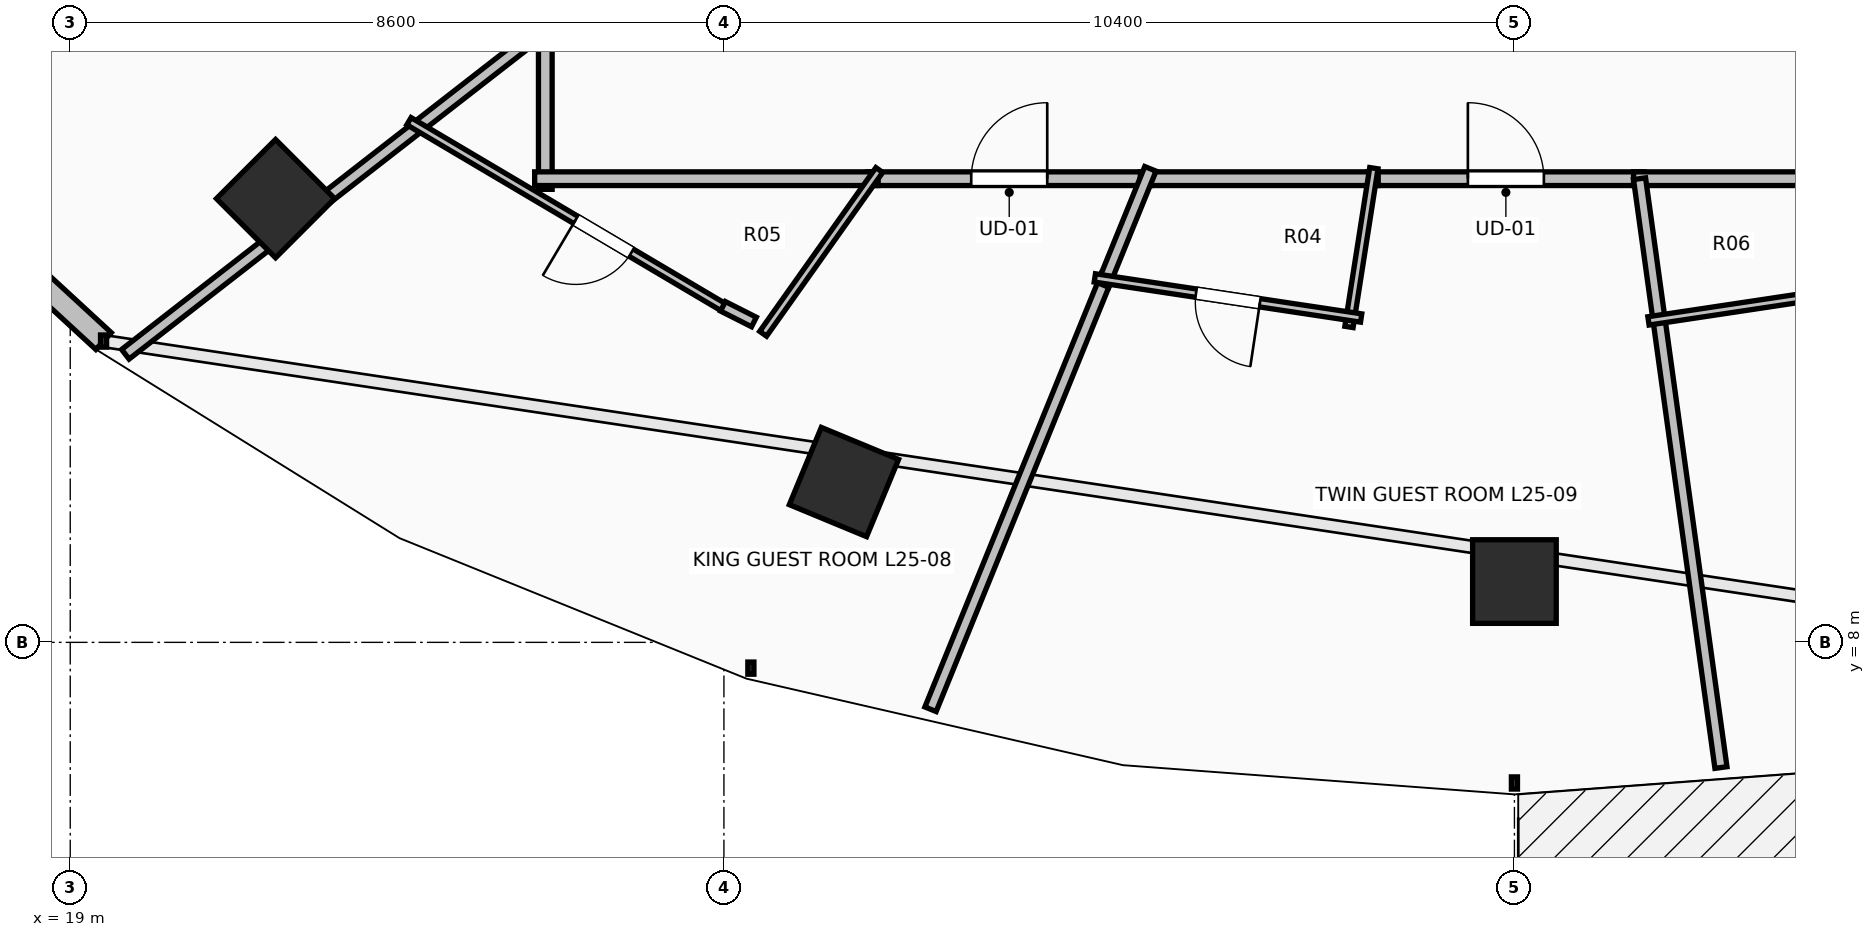
"""IFC4 building model, lengths in metres.
Left out: names, types, materials, properties, quantities, classifications, styles, units other than length and angle.
Written with IfcOpenShell. Run it as: python <this file> out.ifc"""

import sys

from ifc_helpers import new_model, si_unit, direction, frame, frame_2d, origin, origin_2d, place, context, subcontext, project, spatial, rectangle, extrude, element, fill, save


model = new_model("IFC4")
c1 = context("Model", 3, precision=1e-05, world=origin(), true_north=direction((0.0, 1.0)))
c2 = subcontext(c1, "Body", "Model", "MODEL_VIEW")
j1 = project(units=[si_unit("LENGTHUNIT", "METRE"), si_unit("PLANEANGLEUNIT", "RADIAN")], contexts=[c1])
p1 = place(None, origin())
s1 = spatial("IfcSite", under=j1, at=p1, CompositionType="ELEMENT")
p2 = place(p1, origin())
s2 = spatial("IfcBuilding", under=s1, at=p2, CompositionType="ELEMENT")
p3 = place(p2, frame((0.0, 0.0, 96.3)))
s3 = spatial("IfcBuildingStorey", under=s2, at=p3, CompositionType="ELEMENT", Elevation=96.3)
for number, where, z_axis, x_axis in (
    (1, (21.701, 13.838, 0.0), (0.0, 0.0, 1.0), (-0.707, -0.707, 0.0)),
    (2, (29.179, 10.109, 0.0), (0.0, 0.0, 1.0), (-0.383, -0.924, 0.0)),
    (3, (38.0, 8.8, 0.0), (0.0, 0.0, 1.0), (0.0, -1.0, 0.0)),
):
    element("IfcColumn", number, at=place(p3, frame(where, z_axis=z_axis, x_axis=x_axis)), inside=s3, PredefinedType="COLUMN", context=c2, shape_type="SweptSolid", body=[
        extrude(rectangle(XDim=1.1, YDim=1.1, at=origin_2d()), origin(), (0.0, 0.0, 1.0), 3.5),
    ])
p4 = place(p3, frame((16.174, 14.972, 0.0), z_axis=(0.0, 0.0, 1.0), x_axis=(0.735416718093, -0.677615119924, 0.0)))
e4 = element("IfcWall", 4, at=p4, inside=s3, PredefinedType="STANDARD", context=c2, shape_type="SweptSolid", body=[
    extrude(rectangle(XDim=4.439, YDim=0.3, at=frame_2d((2.22, 0.0))), origin(), (0.0, 0.0, 1.0), 3.24),
])
p5 = place(p4, frame((1.32, 0.0, 0.85)))
e5 = element("IfcOpeningElement", 5, at=p5, cuts=e4, PredefinedType="OPENING", context=c2, shape_type="SweptSolid", body=[
    extrude(rectangle(XDim=1.8, YDim=2.19, at=frame_2d((0.9, 1.095))), frame((0.0, 0.165, 0.0), z_axis=(0.0, -1.0, 0.0), x_axis=(1.0, 0.0, 0.0)), (0.0, 0.0, 1.0), 0.33),
])
p6 = place(p3, frame((29.489, 14.1, 0.0), z_axis=(0.0, 0.0, 1.0), x_axis=(1.0, 0.0, 0.0)))
e6 = element("IfcWall", 6, at=p6, inside=s3, PredefinedType="PARTITIONING", context=c2, shape_type="SweptSolid", body=[
    extrude(rectangle(XDim=3.729, YDim=0.18, at=frame_2d((1.865, 0.0))), origin(), (0.0, 0.0, 1.0), 3.24),
])
p7 = place(p6, frame((1.365, 0.0, 0.0)))
e7 = element("IfcOpeningElement", 7, at=p7, cuts=e6, PredefinedType="OPENING", context=c2, shape_type="SweptSolid", body=[
    extrude(rectangle(XDim=1.0, YDim=2.15, at=frame_2d((0.5, 1.075))), frame((0.0, 0.105, 0.0), z_axis=(0.0, -1.0, 0.0), x_axis=(1.0, 0.0, 0.0)), (0.0, 0.0, 1.0), 0.21),
])
p8 = place(p3, frame((25.25, 16.15, 0.0), z_axis=(0.0, 0.0, 1.0), x_axis=(0.0, -1.0, 0.0)))
e8 = element("IfcWall", 8, at=p8, inside=s3, PredefinedType="PARTITIONING", context=c2, shape_type="SweptSolid", body=[
    extrude(rectangle(XDim=2.19, YDim=0.18, at=frame_2d((1.095, 0.0))), origin(), (0.0, 0.0, 1.0), 2.432),
])
p9 = place(p3, frame((25.11, 14.1, 0.0), z_axis=(0.0, 0.0, 1.0), x_axis=(1.0, 0.0, 0.0)))
e9 = element("IfcWall", 9, at=p9, inside=s3, PredefinedType="PARTITIONING", context=c2, shape_type="SweptSolid", body=[
    extrude(rectangle(XDim=4.519, YDim=0.18, at=frame_2d((2.259, 0.0))), origin(), (0.0, 0.0, 1.0), 2.432),
])
p10 = place(p3, frame((36.068, 14.1, 0.0), z_axis=(0.0, 0.0, 1.0), x_axis=(1.0, 0.0, 0.0)))
e10 = element("IfcWall", 10, at=p10, inside=s3, PredefinedType="PARTITIONING", context=c2, shape_type="SweptSolid", body=[
    extrude(rectangle(XDim=3.639, YDim=0.18, at=frame_2d((1.819, 0.0))), origin(), (0.0, 0.0, 1.0), 2.972),
])
p11 = place(p10, frame((1.32, 0.0, 0.0)))
e11 = element("IfcOpeningElement", 11, at=p11, cuts=e10, PredefinedType="OPENING", context=c2, shape_type="SweptSolid", body=[
    extrude(rectangle(XDim=1.0, YDim=2.15, at=frame_2d((0.5, 1.075))), frame((0.0, 0.105, 0.0), z_axis=(0.0, -1.0, 0.0), x_axis=(1.0, 0.0, 0.0)), (0.0, 0.0, 1.0), 0.21),
])
p12 = place(p3, frame((33.078, 14.1, 0.0), z_axis=(0.0, 0.0, 1.0), x_axis=(1.0, 0.0, 0.0)))
e12 = element("IfcWall", 12, at=p12, inside=s3, PredefinedType="PARTITIONING", context=c2, shape_type="SweptSolid", body=[
    extrude(rectangle(XDim=3.13, YDim=0.18, at=frame_2d((1.565, 0.0))), origin(), (0.0, 0.0, 1.0), 2.972),
])
p13 = place(p3, frame((39.567, 14.1, 0.0), z_axis=(0.0, 0.0, 1.0), x_axis=(1.0, 0.0, 0.0)))
e13 = element("IfcWall", 13, at=p13, inside=s3, PredefinedType="PARTITIONING", context=c2, shape_type="SweptSolid", body=[
    extrude(rectangle(XDim=2.773, YDim=0.18, at=frame_2d((1.387, 0.0))), origin(), (0.0, 0.0, 1.0), 2.972),
])
p14 = place(p3, frame((19.725, 11.79, 0.0), z_axis=(0.0, 0.0, 1.0), x_axis=(0.789438616042, 0.613829513384, 0.0)))
e14 = element("IfcWall", 14, at=p14, inside=s3, PredefinedType="PARTITIONING", context=c2, shape_type="SweptSolid", body=[
    extrude(rectangle(XDim=6.999, YDim=0.16, at=frame_2d((3.499, 0.0))), origin(), (0.0, 0.0, 1.0), 2.432),
])
p15 = place(p3, frame((27.611, 12.399, 0.0), z_axis=(0.0, 0.0, 1.0), x_axis=(-0.860667615303, 0.509167218081, 0.0)))
e15 = element("IfcWall", 15, at=p15, inside=s3, PredefinedType="PARTITIONING", context=c2, shape_type="SweptSolid", body=[
    extrude(rectangle(XDim=4.827, YDim=0.11, at=frame_2d((2.413, 0.0))), origin(), (0.0, 0.0, 1.0), 2.432),
])
p16 = place(p15, frame((1.428, 0.0, 0.0)))
e16 = element("IfcOpeningElement", 16, at=p16, cuts=e15, PredefinedType="OPENING", context=c2, shape_type="SweptSolid", body=[
    extrude(rectangle(XDim=0.85, YDim=2.1, at=frame_2d((0.425, 1.05))), frame((0.0, 0.07, 0.0), z_axis=(0.0, -1.0, 0.0), x_axis=(1.0, 0.0, 0.0)), (0.0, 0.0, 1.0), 0.14),
])
p17 = place(p3, frame((29.644, 14.214, 0.0), z_axis=(0.0, 0.0, 1.0), x_axis=(-0.578550668744, -0.815646445279, 0.0)))
e17 = element("IfcWall", 17, at=p17, inside=s3, PredefinedType="PARTITIONING", context=c2, shape_type="SweptSolid", body=[
    extrude(rectangle(XDim=2.641, YDim=0.11, at=frame_2d((1.321, 0.0))), origin(), (0.0, 0.0, 1.0), 2.432),
])
p18 = place(p3, frame((30.318, 7.12, 0.0), z_axis=(0.0, 0.0, 1.0), x_axis=(0.376920780929, 0.926245499263, 0.0)))
e18 = element("IfcWall", 18, at=p18, inside=s3, PredefinedType="PARTITIONING", context=c2, shape_type="SweptSolid", body=[
    extrude(rectangle(XDim=6.166, YDim=0.16, at=frame_2d((3.083, 0.0))), origin(), (0.0, 0.0, 1.0), 2.677),
])
p19 = place(p3, frame((32.589, 12.701, 0.0), z_axis=(0.0, 0.0, 1.0), x_axis=(0.376742177728, 0.926318158907, 0.0)))
e19 = element("IfcWall", 19, at=p19, inside=s3, PredefinedType="PARTITIONING", context=c2, shape_type="SweptSolid", body=[
    extrude(rectangle(XDim=1.65, YDim=0.16, at=frame_2d((0.825, 0.0))), origin(), (0.0, 0.0, 1.0), 2.972),
])
p20 = place(p3, frame((36.151, 14.238, 0.0), z_axis=(0.0, 0.0, 1.0), x_axis=(-0.15485948048, -0.987936506718, 0.0)))
e20 = element("IfcWall", 20, at=p20, inside=s3, PredefinedType="PARTITIONING", context=c2, shape_type="SweptSolid", body=[
    extrude(rectangle(XDim=2.114, YDim=0.11, at=frame_2d((1.057, 0.0))), origin(), (0.0, 0.0, 1.0), 2.922),
])
p21 = place(p3, frame((35.983, 12.267, 0.0), z_axis=(0.0, 0.0, 1.0), x_axis=(-0.988843169739, 0.148960349288, 0.0)))
e21 = element("IfcWall", 21, at=p21, inside=s3, PredefinedType="PARTITIONING", context=c2, shape_type="SweptSolid", body=[
    extrude(rectangle(XDim=3.543, YDim=0.11, at=frame_2d((1.772, 0.0))), origin(), (0.0, 0.0, 1.0), 2.922),
])
p22 = place(p21, frame((1.347, 0.0, 0.0)))
e22 = element("IfcOpeningElement", 22, at=p22, cuts=e21, PredefinedType="OPENING", context=c2, shape_type="SweptSolid", body=[
    extrude(rectangle(XDim=0.85, YDim=2.1, at=frame_2d((0.425, 1.05))), frame((0.0, 0.07, 0.0), z_axis=(0.0, -1.0, 0.0), x_axis=(1.0, 0.0, 0.0)), (0.0, 0.0, 1.0), 0.14),
])
p23 = place(p3, frame((40.717, 6.353, 0.0), z_axis=(0.0, 0.0, 1.0), x_axis=(-0.136949014068, 0.990578097651, 0.0)))
e23 = element("IfcWall", 23, at=p23, inside=s3, PredefinedType="PARTITIONING", context=c2, shape_type="SweptSolid", body=[
    extrude(rectangle(XDim=7.821, YDim=0.16, at=frame_2d((3.91, 0.0))), origin(), (0.0, 0.0, 1.0), 2.432),
])
p24 = place(p3, frame((44.961, 13.011, 0.0), z_axis=(0.0, 0.0, 1.0), x_axis=(-0.98888518965, -0.148681141008, 0.0)))
e24 = element("IfcWall", 24, at=p24, inside=s3, PredefinedType="PARTITIONING", context=c2, shape_type="SweptSolid", body=[
    extrude(rectangle(XDim=5.256, YDim=0.11, at=frame_2d((2.628, 0.0))), origin(), (0.0, 0.0, 1.0), 2.432),
])
p25 = place(p24, frame((2.203, 0.0, 0.0)))
e25 = element("IfcOpeningElement", 25, at=p25, cuts=e24, PredefinedType="OPENING", context=c2, shape_type="SweptSolid", body=[
    extrude(rectangle(XDim=0.85, YDim=2.1, at=frame_2d((0.425, 1.05))), frame((0.0, 0.07, 0.0), z_axis=(0.0, -1.0, 0.0), x_axis=(1.0, 0.0, 0.0)), (0.0, 0.0, 1.0), 0.14),
])
p26 = place(p3, frame((27.587, 12.421, 0.0), z_axis=(0.0, 0.0, 1.0), x_axis=(0.892279780373, -0.451482882884, 0.0)))
e26 = element("IfcWall", 26, at=p26, inside=s3, PredefinedType="PARTITIONING", context=c2, shape_type="SweptSolid", body=[
    extrude(rectangle(XDim=0.457, YDim=0.14, at=frame_2d((0.229, 0.0))), origin(), (0.0, 0.0, 1.0), 3.24),
])
p27 = place(p7, origin())
e27 = element("IfcDoor", 27, at=p27, inside=s3, OperationType="SINGLE_SWING_RIGHT", PredefinedType="DOOR", context=c2, shape_type="SweptSolid", body=[
    extrude(rectangle(XDim=1.0, YDim=2.15, at=frame_2d((0.5, 1.075))), frame((0.0, 0.025, 0.0), z_axis=(0.0, -1.0, 0.0), x_axis=(1.0, 0.0, 0.0)), (0.0, 0.0, 1.0), 0.05),
])
fill(e7, e27)
p28 = place(p11, origin())
e28 = element("IfcDoor", 28, at=p28, inside=s3, OperationType="SINGLE_SWING_LEFT", PredefinedType="DOOR", context=c2, shape_type="SweptSolid", body=[
    extrude(rectangle(XDim=1.0, YDim=2.15, at=frame_2d((0.5, 1.075))), frame((0.0, 0.025, 0.0), z_axis=(0.0, -1.0, 0.0), x_axis=(1.0, 0.0, 0.0)), (0.0, 0.0, 1.0), 0.05),
])
fill(e11, e28)
p29 = place(p16, origin())
e29 = element("IfcDoor", 29, at=p29, inside=s3, OperationType="SINGLE_SWING_RIGHT", PredefinedType="DOOR", context=c2, shape_type="SweptSolid", body=[
    extrude(rectangle(XDim=0.85, YDim=2.1, at=frame_2d((0.425, 1.05))), frame((0.0, 0.025, 0.0), z_axis=(0.0, -1.0, 0.0), x_axis=(1.0, 0.0, 0.0)), (0.0, 0.0, 1.0), 0.05),
])
fill(e16, e29)
p30 = place(p22, origin())
e30 = element("IfcDoor", 30, at=p30, inside=s3, OperationType="SINGLE_SWING_LEFT", PredefinedType="DOOR", context=c2, shape_type="SweptSolid", body=[
    extrude(rectangle(XDim=0.85, YDim=2.1, at=frame_2d((0.425, 1.05))), frame((0.0, 0.025, 0.0), z_axis=(0.0, -1.0, 0.0), x_axis=(1.0, 0.0, 0.0)), (0.0, 0.0, 1.0), 0.05),
])
fill(e22, e30)
save(model, sys.argv[1])
